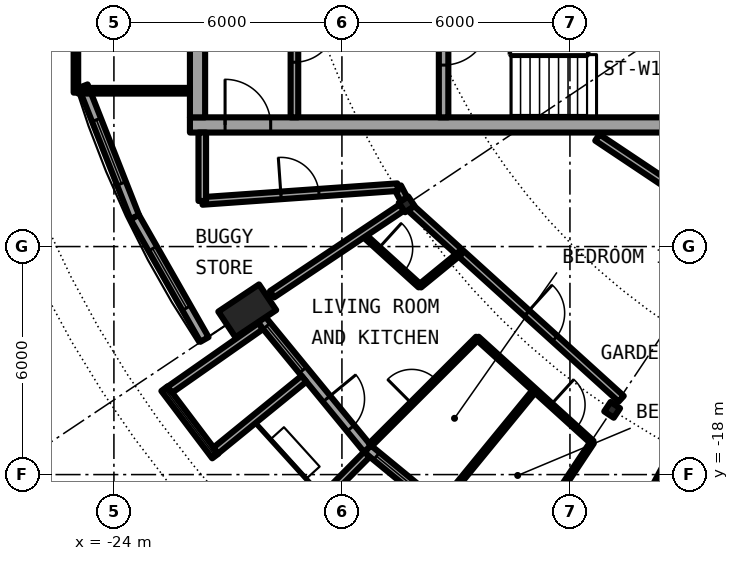
"""IFC4 building model, lengths in metres.
Left out: names, types, materials, properties, quantities, classifications, styles, units other than length and angle.
Written with IfcOpenShell. Run it as: python <this file> out.ifc"""

import sys

from ifc_helpers import new_model, si_unit, direction, frame, frame_2d, origin, origin_2d, place, context, subcontext, project, spatial, rectangle, circle, hollow_circle, i_section, extrude, element, fill, save


model = new_model("IFC4")
c1 = context("Model", 3, precision=1e-05, world=origin(), true_north=direction((0.0, 1.0)))
c2 = subcontext(c1, "Body", "Model", "MODEL_VIEW")
j1 = project(units=[si_unit("LENGTHUNIT", "METRE"), si_unit("PLANEANGLEUNIT", "RADIAN")], contexts=[c1])
p1 = place(None, origin())
s1 = spatial("IfcSite", under=j1, at=p1, CompositionType="ELEMENT")
p2 = place(p1, origin())
s2 = spatial("IfcBuilding", under=s1, at=p2, CompositionType="ELEMENT")
p3 = place(p2, frame((0.0, 0.0, 243.2)))
s3 = spatial("IfcBuildingStorey", under=s2, at=p3, CompositionType="ELEMENT", Elevation=243.2)
p4 = place(p3, frame((-21.027, -14.05, 0.242), z_axis=(0.346875102267, 0.231750495433, 0.908828570905), x_axis=(-0.555530396269, 0.831496228988, 0.0)))
e1 = element("IfcColumn", 1, at=p4, inside=s3, PredefinedType="COLUMN", context=c2, shape_type="SweptSolid", body=[
    extrude(hollow_circle(Radius=0.406, WallThickness=0.03, at=origin_2d()), origin(), (0.0, 0.0, 1.0), 3.09),
])
for number, where, z_axis, x_axis in (
    (2, (-16.297, -10.889, 0.0), (0.0, 0.0, 1.0), (-0.831, -0.556, 0.0)),
    (3, (-10.889, -16.297, 0.0), (0.0, 0.0, 1.0), (-0.556, -0.831, 0.0)),
):
    element("IfcColumn", number, at=place(p3, frame(where, z_axis=z_axis, x_axis=x_axis)), inside=s3, PredefinedType="COLUMN", context=c2, shape_type="SweptSolid", body=[
        extrude(i_section(OverallWidth=0.3, OverallDepth=0.3, WebThickness=0.011, FlangeThickness=0.019, FilletRadius=0.027, at=origin_2d()), origin(), (0.0, 0.0, 1.0), 3.05),
    ])
p5 = place(p3, frame((-20.371, -13.611, 0.0), z_axis=(0.0, 0.0, 1.0), x_axis=(0.634396836208, -0.773007538262, 0.0)))
e4 = element("IfcWall", 4, at=p5, inside=s3, PredefinedType="SOLIDWALL", context=c2, shape_type="SweptSolid", body=[
    extrude(rectangle(XDim=4.803, YDim=0.25, at=frame_2d((2.402, 0.0))), origin(), (0.0, 0.0, 1.0), 2.7),
])
p6 = place(p5, frame((0.62, 0.0, 0.3)))
e5 = element("IfcOpeningElement", 5, at=p6, cuts=e4, PredefinedType="OPENING", context=c2, shape_type="SweptSolid", body=[
    extrude(rectangle(XDim=1.5, YDim=2.1, at=frame_2d((0.75, 1.05))), frame((0.0, 0.135, 0.0), z_axis=(0.0, -1.0, 0.0), x_axis=(1.0, 0.0, 0.0)), (0.0, 0.0, 1.0), 0.27),
])
p7 = place(p5, frame((3.099, 0.0, 0.0)))
e6 = element("IfcOpeningElement", 6, at=p7, cuts=e4, PredefinedType="OPENING", context=c2, shape_type="SweptSolid", body=[
    extrude(rectangle(XDim=1.0, YDim=2.2, at=frame_2d((0.5, 1.1))), frame((0.0, 0.135, 0.0), z_axis=(0.0, -1.0, 0.0), x_axis=(1.0, 0.0, 0.0)), (0.0, 0.0, 1.0), 0.27),
])
p8 = place(p3, frame((-22.672, -15.74, -0.03), z_axis=(0.0, 0.0, 1.0), x_axis=(0.602915500641, -0.797805050803, 0.0)))
e7 = element("IfcWall", 7, at=p8, inside=s3, PredefinedType="SOLIDWALL", context=c2, shape_type="SweptSolid", body=[
    extrude(rectangle(XDim=2.221, YDim=0.2, at=frame_2d((1.11, 0.0))), origin(), (0.0, 0.0, 1.0), 2.73),
])
p9 = place(p8, frame((0.071, 0.0, 0.33)))
e8 = element("IfcOpeningElement", 8, at=p9, cuts=e7, PredefinedType="OPENING", context=c2, shape_type="SweptSolid", body=[
    extrude(circle(Radius=1.04, at=frame_2d((1.04, 1.04))), frame((0.0, 0.11, 0.0), z_axis=(0.0, -1.0, 0.0), x_axis=(1.0, 0.0, 0.0)), (0.0, 0.0, 1.0), 0.22),
])
p10 = place(p3, frame((-20.138, -14.093, -0.03), z_axis=(0.0, 0.0, 1.0), x_axis=(-0.81913764619, -0.573596998419, 0.0)))
e9 = element("IfcWall", 9, at=p10, inside=s3, PredefinedType="SOLIDWALL", context=c2, shape_type="SweptSolid", body=[
    extrude(rectangle(XDim=2.92, YDim=0.2, at=frame_2d((1.46, 0.0))), origin(), (0.0, 0.0, 1.0), 2.73),
])
p11 = place(p3, frame((-19.0, -15.479, -0.03), z_axis=(0.0, 0.0, 1.0), x_axis=(-0.775612161439, -0.631209771017, 0.0)))
e10 = element("IfcWall", 10, at=p11, inside=s3, PredefinedType="SOLIDWALL", context=c2, shape_type="SweptSolid", body=[
    extrude(rectangle(XDim=2.992, YDim=0.2, at=frame_2d((1.496, 0.0))), origin(), (0.0, 0.0, 1.0), 2.73),
])
p12 = place(p3, frame((-17.324, -17.324, 0.0), z_axis=(0.0, 0.0, 1.0), x_axis=(0.773007538262, -0.634396836208, 0.0)))
e11 = element("IfcWall", 11, at=p12, inside=s3, PredefinedType="SOLIDWALL", context=c2, shape_type="SweptSolid", body=[
    extrude(rectangle(XDim=4.803, YDim=0.25, at=frame_2d((2.402, 0.0))), origin(), (0.0, 0.0, 1.0), 2.7),
])
p13 = place(p12, frame((0.304, 0.0, 0.3)))
e12 = element("IfcOpeningElement", 12, at=p13, cuts=e11, PredefinedType="OPENING", context=c2, shape_type="SweptSolid", body=[
    extrude(rectangle(XDim=1.8, YDim=2.1, at=frame_2d((0.9, 1.05))), frame((0.0, 0.135, 0.0), z_axis=(0.0, -1.0, 0.0), x_axis=(1.0, 0.0, 0.0)), (0.0, 0.0, 1.0), 0.27),
])
p14 = place(p12, frame((3.099, 0.0, 0.0)))
e13 = element("IfcOpeningElement", 13, at=p14, cuts=e11, PredefinedType="OPENING", context=c2, shape_type="SweptSolid", body=[
    extrude(rectangle(XDim=1.0, YDim=2.2, at=frame_2d((0.5, 1.1))), frame((0.0, 0.135, 0.0), z_axis=(0.0, -1.0, 0.0), x_axis=(1.0, 0.0, 0.0)), (0.0, 0.0, 1.0), 0.27),
])
p15 = place(p3, frame((-17.344, -17.47, -0.03), z_axis=(0.0, 0.0, 1.0), x_axis=(-0.704306055012, -0.709896457854, 0.0)))
e14 = element("IfcWall", 14, at=p15, inside=s3, PredefinedType="SOLIDWALL", context=c2, shape_type="SweptSolid", body=[
    extrude(rectangle(XDim=2.882, YDim=0.2, at=frame_2d((1.441, 0.0))), origin(), (0.0, 0.0, 1.0), 2.73),
])
p16 = place(p3, frame((-24.809, -7.779, 0.0), z_axis=(0.0, 0.0, 1.0), x_axis=(0.366351636034, -0.930476479432, 0.0)))
e15 = element("IfcWall", 15, at=p16, inside=s3, PredefinedType="SOLIDWALL", context=c2, shape_type="SweptSolid", body=[
    extrude(rectangle(XDim=3.705, YDim=0.25, at=frame_2d((1.852, 0.0))), origin(), (0.0, 0.0, 1.0), 2.7),
])
p17 = place(p16, frame((0.952, 0.0, 0.3)))
e16 = element("IfcOpeningElement", 16, at=p17, cuts=e15, PredefinedType="OPENING", context=c2, shape_type="SweptSolid", body=[
    extrude(rectangle(XDim=1.8, YDim=2.1, at=frame_2d((0.9, 1.05))), frame((0.0, 0.135, 0.0), z_axis=(0.0, -1.0, 0.0), x_axis=(1.0, 0.0, 0.0)), (0.0, 0.0, 1.0), 0.27),
])
p18 = place(p3, frame((-23.452, -11.226, 0.0), z_axis=(0.0, 0.0, 1.0), x_axis=(0.495031435966, -0.868875064325, 0.0)))
e17 = element("IfcWall", 17, at=p18, inside=s3, PredefinedType="SOLIDWALL", context=c2, shape_type="SweptSolid", body=[
    extrude(rectangle(XDim=3.705, YDim=0.25, at=frame_2d((1.853, 0.0))), origin(), (0.0, 0.0, 1.0), 2.7),
])
p19 = place(p18, frame((0.952, 0.0, 0.3)))
e18 = element("IfcOpeningElement", 18, at=p19, cuts=e17, PredefinedType="OPENING", context=c2, shape_type="SweptSolid", body=[
    extrude(rectangle(XDim=1.8, YDim=2.1, at=frame_2d((0.9, 1.05))), frame((0.0, 0.135, 0.0), z_axis=(0.0, -1.0, 0.0), x_axis=(1.0, 0.0, 0.0)), (0.0, 0.0, 1.0), 0.27),
])
p20 = place(p3, frame((-22.0, -8.8, 0.0), z_axis=(0.0, 0.0, 1.0), x_axis=(1.0, 0.0, 0.0)))
e19 = element("IfcWall", 19, at=p20, inside=s3, PredefinedType="SHEAR", context=c2, shape_type="SweptSolid", body=[
    extrude(rectangle(XDim=13.4, YDim=0.4, at=frame_2d((6.7, 0.0))), origin(), (0.0, 0.0, 1.0), 3.05),
])
p21 = place(p20, frame((0.925, 0.0, 0.0)))
e20 = element("IfcOpeningElement", 20, at=p21, cuts=e19, PredefinedType="OPENING", context=c2, shape_type="SweptSolid", body=[
    extrude(rectangle(XDim=1.2, YDim=2.3, at=frame_2d((0.6, 1.15))), frame((0.0, 0.21, 0.0), z_axis=(0.0, -1.0, 0.0), x_axis=(1.0, 0.0, 0.0)), (0.0, 0.0, 1.0), 0.42),
])
p22 = place(p3, frame((-21.8, -8.6, 0.0), z_axis=(0.0, 0.0, 1.0), x_axis=(0.0, 1.0, 0.0)))
e21 = element("IfcWall", 21, at=p22, inside=s3, PredefinedType="SHEAR", context=c2, shape_type="SweptSolid", body=[
    extrude(rectangle(XDim=17.2, YDim=0.4, at=frame_2d((8.6, 0.0))), origin(), (0.0, 0.0, 1.0), 3.05),
])
p23 = place(p22, frame((7.7, 0.0, 0.0)))
e22 = element("IfcOpeningElement", 22, at=p23, cuts=e21, PredefinedType="OPENING", context=c2, shape_type="SweptSolid", body=[
    extrude(rectangle(XDim=1.8, YDim=2.3, at=frame_2d((0.9, 1.15))), frame((0.0, 0.21, 0.0), z_axis=(0.0, -1.0, 0.0), x_axis=(1.0, 0.0, 0.0)), (0.0, 0.0, 1.0), 0.42),
])
p24 = place(p3, frame((-15.325, -4.65, 0.0), z_axis=(0.0, 0.0, 1.0), x_axis=(0.0, -1.0, 0.0)))
e23 = element("IfcWall", 23, at=p24, inside=s3, PredefinedType="SHEAR", context=c2, shape_type="SweptSolid", body=[
    extrude(rectangle(XDim=3.95, YDim=0.25, at=frame_2d((1.975, 0.0))), origin(), (0.0, 0.0, 1.0), 3.05),
])
p25 = place(p24, frame((1.375, 0.0, 0.0)))
e24 = element("IfcOpeningElement", 24, at=p25, cuts=e23, PredefinedType="OPENING", context=c2, shape_type="SweptSolid", body=[
    extrude(rectangle(XDim=1.2, YDim=2.3, at=frame_2d((0.6, 1.15))), frame((0.0, 0.135, 0.0), z_axis=(0.0, -1.0, 0.0), x_axis=(1.0, 0.0, 0.0)), (0.0, 0.0, 1.0), 0.27),
])
p26 = place(p3, frame((-19.25, -1.575, 0.0), z_axis=(0.0, 0.0, 1.0), x_axis=(0.0, -1.0, 0.0)))
e25 = element("IfcWall", 25, at=p26, inside=s3, PredefinedType="SOLIDWALL", context=c2, shape_type="SweptSolid", body=[
    extrude(rectangle(XDim=7.025, YDim=0.2, at=frame_2d((3.513, 0.0))), origin(), (0.0, 0.0, 1.0), 2.7),
])
p27 = place(p26, frame((4.475, 0.0, 0.0)))
e26 = element("IfcOpeningElement", 26, at=p27, cuts=e25, PredefinedType="OPENING", context=c2, shape_type="SweptSolid", body=[
    extrude(rectangle(XDim=1.1, YDim=2.3, at=frame_2d((0.55, 1.15))), frame((0.0, 0.11, 0.0), z_axis=(0.0, -1.0, 0.0), x_axis=(1.0, 0.0, 0.0)), (0.0, 0.0, 1.0), 0.22),
])
p28 = place(p3, frame((-22.0, -7.9, 0.0), z_axis=(0.0, 0.0, 1.0), x_axis=(-1.0, 0.0, 0.0)))
e27 = element("IfcWall", 27, at=p28, inside=s3, PredefinedType="PARTITIONING", context=c2, shape_type="SweptSolid", body=[
    extrude(rectangle(XDim=2.94, YDim=0.15, at=frame_2d((1.47, 0.0))), origin(), (0.0, 0.0, 1.0), 2.7),
])
p29 = place(p3, frame((-25.0, 7.95, 0.0), z_axis=(0.0, 0.0, 1.0), x_axis=(0.0, -1.0, 0.0)))
e28 = element("IfcWall", 28, at=p29, inside=s3, PredefinedType="PARTITIONING", context=c2, shape_type="SweptSolid", body=[
    extrude(rectangle(XDim=15.9, YDim=0.12, at=frame_2d((7.95, 0.0))), origin(), (0.0, 0.0, 1.0), 2.7),
])
p30 = place(p29, frame((0.95, 0.0, 0.1)))
e29 = element("IfcOpeningElement", 29, at=p30, cuts=e28, PredefinedType="OPENING", context=c2, shape_type="SweptSolid", body=[
    extrude(rectangle(XDim=14.0, YDim=2.35, at=frame_2d((7.0, 1.175))), frame((0.0, 0.07, 0.0), z_axis=(0.0, -1.0, 0.0), x_axis=(1.0, 0.0, 0.0)), (0.0, 0.0, 1.0), 0.14),
])
p31 = place(p3, frame((-17.461, -11.667, 0.0), z_axis=(0.0, 0.0, 1.0), x_axis=(0.740773018627, -0.671755412984, 0.0)))
e30 = element("IfcWall", 30, at=p31, inside=s3, PredefinedType="PARTITIONING", context=c2, shape_type="SweptSolid", body=[
    extrude(rectangle(XDim=2.041, YDim=0.1, at=frame_2d((1.021, 0.0))), origin(), (0.0, 0.0, 1.0), 2.7),
])
p32 = place(p31, frame((0.571, 0.0, 0.0)))
e31 = element("IfcOpeningElement", 31, at=p32, cuts=e30, PredefinedType="OPENING", context=c2, shape_type="SweptSolid", body=[
    extrude(rectangle(XDim=0.9, YDim=2.3, at=frame_2d((0.45, 1.15))), frame((0.0, 0.06, 0.0), z_axis=(0.0, -1.0, 0.0), x_axis=(1.0, 0.0, 0.0)), (0.0, 0.0, 1.0), 0.12),
])
p33 = place(p3, frame((-14.437, -14.409, 0.0), z_axis=(0.0, 0.0, 1.0), x_axis=(0.740802780294, -0.671722592078, 0.0)))
e32 = element("IfcWall", 32, at=p33, inside=s3, PredefinedType="PARTITIONING", context=c2, shape_type="SweptSolid", body=[
    extrude(rectangle(XDim=4.082, YDim=0.1, at=frame_2d((2.041, 0.0))), origin(), (0.0, 0.0, 1.0), 2.7),
])
p34 = place(p33, frame((2.612, 0.0, 0.0)))
e33 = element("IfcOpeningElement", 33, at=p34, cuts=e32, PredefinedType="OPENING", context=c2, shape_type="SweptSolid", body=[
    extrude(rectangle(XDim=0.9, YDim=2.3, at=frame_2d((0.45, 1.15))), frame((0.0, 0.06, 0.0), z_axis=(0.0, -1.0, 0.0), x_axis=(1.0, 0.0, 0.0)), (0.0, 0.0, 1.0), 0.12),
])
p35 = place(p3, frame((-16.535, -10.437, 0.0), z_axis=(0.0, 0.0, 1.0), x_axis=(0.465802239822, -0.884888848035, 0.0)))
e34 = element("IfcWall", 34, at=p35, inside=s3, PredefinedType="PARTITIONING", context=c2, shape_type="SweptSolid", body=[
    extrude(rectangle(XDim=0.361, YDim=0.2, at=frame_2d((0.18, 0.0))), origin(), (0.0, 0.0, 1.0), 2.7),
])
p36 = place(p3, frame((-16.182, -10.993, 0.0), z_axis=(0.0, 0.0, 1.0), x_axis=(0.740939653983, -0.671571611339, 0.0)))
e35 = element("IfcWall", 35, at=p36, inside=s3, PredefinedType="PARTITIONING", context=c2, shape_type="SweptSolid", body=[
    extrude(rectangle(XDim=7.465, YDim=0.2, at=frame_2d((3.732, 0.0))), origin(), (0.0, 0.0, 1.0), 2.45),
])
p37 = place(p36, frame((4.107, 0.0, 0.0)))
e36 = element("IfcOpeningElement", 36, at=p37, cuts=e35, PredefinedType="OPENING", context=c2, shape_type="SweptSolid", body=[
    extrude(rectangle(XDim=1.0, YDim=2.3, at=frame_2d((0.5, 1.15))), frame((0.0, 0.11, 0.0), z_axis=(0.0, -1.0, 0.0), x_axis=(1.0, 0.0, 0.0)), (0.0, 0.0, 1.0), 0.22),
])
p38 = place(p3, frame((-11.279, -9.131, 0.0), z_axis=(0.0, 0.0, 1.0), x_axis=(0.831522779461, -0.555490654501, 0.0)))
e37 = element("IfcWall", 37, at=p38, inside=s3, PredefinedType="PARTITIONING", context=c2, shape_type="SweptSolid", body=[
    extrude(rectangle(XDim=10.047, YDim=0.2, at=frame_2d((5.023, 0.0))), origin(), (0.0, 0.0, 1.0), 2.7),
])
p39 = place(p38, frame((5.239, 0.0, 0.0)))
e38 = element("IfcOpeningElement", 38, at=p39, cuts=e37, PredefinedType="OPENING", context=c2, shape_type="SweptSolid", body=[
    extrude(rectangle(XDim=1.0, YDim=2.3, at=frame_2d((0.5, 1.15))), frame((0.0, 0.11, 0.0), z_axis=(0.0, -1.0, 0.0), x_axis=(1.0, 0.0, 0.0)), (0.0, 0.0, 1.0), 0.22),
])
p40 = place(p3, frame((-21.675, -10.8, 0.0), z_axis=(0.0, 0.0, 1.0), x_axis=(0.997515141784, 0.070452408845, 0.0)))
e39 = element("IfcWall", 39, at=p40, inside=s3, PredefinedType="PARTITIONING", context=c2, shape_type="SweptSolid", body=[
    extrude(rectangle(XDim=5.153, YDim=0.2, at=frame_2d((2.576, 0.0))), origin(), (0.0, 0.0, 1.0), 2.7),
])
p41 = place(p40, frame((2.076, 0.0, 0.0)))
e40 = element("IfcOpeningElement", 40, at=p41, cuts=e39, PredefinedType="OPENING", context=c2, shape_type="SweptSolid", body=[
    extrude(rectangle(XDim=1.0, YDim=2.3, at=frame_2d((0.5, 1.15))), frame((0.0, 0.11, 0.0), z_axis=(0.0, -1.0, 0.0), x_axis=(1.0, 0.0, 0.0)), (0.0, 0.0, 1.0), 0.22),
])
p42 = place(p3, frame((-19.838, -13.255, 0.0), z_axis=(0.0, 0.0, 1.0), x_axis=(0.831400632185, 0.55567345519, 0.0)))
e41 = element("IfcWall", 41, at=p42, inside=s3, PredefinedType="PARTITIONING", context=c2, shape_type="SweptSolid", body=[
    extrude(rectangle(XDim=4.108, YDim=0.2, at=frame_2d((2.054, 0.0))), origin(), (0.0, 0.0, 1.0), 2.7),
])
p43 = place(p3, frame((-17.252, -17.219, 0.0), z_axis=(0.0, 0.0, 1.0), x_axis=(0.707720109647, 0.706492920277, 0.0)))
e42 = element("IfcWall", 42, at=p43, inside=s3, PredefinedType="PARTITIONING", context=c2, shape_type="SweptSolid", body=[
    extrude(rectangle(XDim=3.979, YDim=0.1, at=frame_2d((1.989, 0.0))), origin(), (0.0, 0.0, 1.0), 2.7),
])
p44 = place(p43, frame((1.539, 0.0, 0.0)))
e43 = element("IfcOpeningElement", 43, at=p44, cuts=e42, PredefinedType="OPENING", context=c2, shape_type="SweptSolid", body=[
    extrude(rectangle(XDim=0.9, YDim=2.3, at=frame_2d((0.45, 1.15))), frame((0.0, 0.06, 0.0), z_axis=(0.0, -1.0, 0.0), x_axis=(1.0, 0.0, 0.0)), (0.0, 0.0, 1.0), 0.12),
])
p45 = place(p3, frame((-15.949, -13.038, 0.0), z_axis=(0.0, 0.0, 1.0), x_axis=(0.774099733189, 0.633063664315, 0.0)))
e44 = element("IfcWall", 44, at=p45, inside=s3, PredefinedType="PARTITIONING", context=c2, shape_type="SweptSolid", body=[
    extrude(rectangle(XDim=1.375, YDim=0.1, at=frame_2d((0.687, 0.0))), origin(), (0.0, 0.0, 1.0), 2.7),
])
p46 = place(p3, frame((-15.445, -18.857, 0.0), z_axis=(0.0, 0.0, 1.0), x_axis=(0.633648720881, 0.77362090104, 0.0)))
e45 = element("IfcWall", 45, at=p46, inside=s3, PredefinedType="PARTITIONING", context=c2, shape_type="SweptSolid", body=[
    extrude(rectangle(XDim=3.979, YDim=0.1, at=frame_2d((1.989, 0.0))), origin(), (0.0, 0.0, 1.0), 2.7),
])
p47 = place(p3, frame((-13.217, -19.864, 0.0), z_axis=(0.0, 0.0, 1.0), x_axis=(0.553749157203, 0.832683535862, 0.0)))
e46 = element("IfcWall", 46, at=p47, inside=s3, PredefinedType="PARTITIONING", context=c2, shape_type="SweptSolid", body=[
    extrude(rectangle(XDim=3.26, YDim=0.1, at=frame_2d((1.63, 0.0))), origin(), (0.0, 0.0, 1.0), 2.7),
])
p48 = place(p47, frame((0.922, 0.0, 0.0)))
e47 = element("IfcOpeningElement", 47, at=p48, cuts=e46, PredefinedType="OPENING", context=c2, shape_type="SweptSolid", body=[
    extrude(rectangle(XDim=0.9, YDim=2.3, at=frame_2d((0.45, 1.15))), frame((0.0, 0.06, 0.0), z_axis=(0.0, -1.0, 0.0), x_axis=(1.0, 0.0, 0.0)), (0.0, 0.0, 1.0), 0.12),
])
p49 = place(p3, frame((-21.675, -10.8, 0.0), z_axis=(0.0, 0.0, 1.0), x_axis=(0.0, 1.0, 0.0)))
e48 = element("IfcWall", 48, at=p49, inside=s3, PredefinedType="PARTITIONING", context=c2, shape_type="SweptSolid", body=[
    extrude(rectangle(XDim=1.8, YDim=0.2, at=frame_2d((0.9, 0.0))), origin(), (0.0, 0.0, 1.0), 2.7),
])
p50 = place(p3, frame((-9.889, -18.502, 0.0), z_axis=(0.0, 0.0, 1.0), x_axis=(0.471138605408, 0.882059189904, 0.0)))
e49 = element("IfcWall", 49, at=p50, inside=s3, PredefinedType="PARTITIONING", context=c2, shape_type="SweptSolid", body=[
    extrude(rectangle(XDim=1.358, YDim=0.1, at=frame_2d((0.679, 0.0))), origin(), (0.0, 0.0, 1.0), 2.7),
])
p51 = place(p6, origin())
e50 = element("IfcWindow", 50, at=p51, inside=s3, PartitioningType="SINGLE_PANEL", PredefinedType="WINDOW", context=c2, shape_type="SweptSolid", body=[
    extrude(rectangle(XDim=1.5, YDim=2.1, at=frame_2d((0.75, 1.05))), frame((0.0, 0.03, 0.0), z_axis=(0.0, -1.0, 0.0), x_axis=(1.0, 0.0, 0.0)), (0.0, 0.0, 1.0), 0.06),
])
fill(e5, e50)
p52 = place(p9, origin())
e51 = element("IfcWindow", 51, at=p52, inside=s3, PartitioningType="SINGLE_PANEL", PredefinedType="WINDOW", context=c2, shape_type="SweptSolid", body=[
    extrude(circle(Radius=1.04, at=frame_2d((1.04, 1.04))), frame((0.0, 0.03, 0.0), z_axis=(0.0, -1.0, 0.0), x_axis=(1.0, 0.0, 0.0)), (0.0, 0.0, 1.0), 0.06),
])
fill(e8, e51)
p53 = place(p7, origin())
e52 = element("IfcDoor", 52, at=p53, inside=s3, OperationType="SINGLE_SWING_LEFT", PredefinedType="DOOR", context=c2, shape_type="SweptSolid", body=[
    extrude(rectangle(XDim=1.0, YDim=2.2, at=frame_2d((0.5, 1.1))), frame((0.0, 0.025, 0.0), z_axis=(0.0, -1.0, 0.0), x_axis=(1.0, 0.0, 0.0)), (0.0, 0.0, 1.0), 0.05),
])
fill(e6, e52)
p54 = place(p13, origin())
e53 = element("IfcWindow", 53, at=p54, inside=s3, PartitioningType="SINGLE_PANEL", PredefinedType="WINDOW", context=c2, shape_type="SweptSolid", body=[
    extrude(rectangle(XDim=1.8, YDim=2.1, at=frame_2d((0.9, 1.05))), frame((0.0, 0.03, 0.0), z_axis=(0.0, -1.0, 0.0), x_axis=(1.0, 0.0, 0.0)), (0.0, 0.0, 1.0), 0.06),
])
fill(e12, e53)
p55 = place(p17, origin())
e54 = element("IfcWindow", 54, at=p55, inside=s3, PartitioningType="SINGLE_PANEL", PredefinedType="WINDOW", context=c2, shape_type="SweptSolid", body=[
    extrude(rectangle(XDim=1.8, YDim=2.1, at=frame_2d((0.9, 1.05))), frame((0.0, 0.03, 0.0), z_axis=(0.0, -1.0, 0.0), x_axis=(1.0, 0.0, 0.0)), (0.0, 0.0, 1.0), 0.06),
])
fill(e16, e54)
p56 = place(p19, origin())
e55 = element("IfcWindow", 55, at=p56, inside=s3, PartitioningType="SINGLE_PANEL", PredefinedType="WINDOW", context=c2, shape_type="SweptSolid", body=[
    extrude(rectangle(XDim=1.8, YDim=2.1, at=frame_2d((0.9, 1.05))), frame((0.0, 0.03, 0.0), z_axis=(0.0, -1.0, 0.0), x_axis=(1.0, 0.0, 0.0)), (0.0, 0.0, 1.0), 0.06),
])
fill(e18, e55)
p57 = place(p25, origin())
e56 = element("IfcDoor", 56, at=p57, inside=s3, OperationType="SINGLE_SWING_LEFT", PredefinedType="DOOR", context=c2, shape_type="SweptSolid", body=[
    extrude(rectangle(XDim=1.2, YDim=2.3, at=frame_2d((0.6, 1.15))), frame((0.0, 0.025, 0.0), z_axis=(0.0, -1.0, 0.0), x_axis=(1.0, 0.0, 0.0)), (0.0, 0.0, 1.0), 0.05),
])
fill(e24, e56)
p58 = place(p27, origin())
e57 = element("IfcDoor", 57, at=p58, inside=s3, OperationType="SINGLE_SWING_LEFT", PredefinedType="DOOR", context=c2, shape_type="SweptSolid", body=[
    extrude(rectangle(XDim=1.1, YDim=2.3, at=frame_2d((0.55, 1.15))), frame((0.0, 0.025, 0.0), z_axis=(0.0, -1.0, 0.0), x_axis=(1.0, 0.0, 0.0)), (0.0, 0.0, 1.0), 0.05),
])
fill(e26, e57)
p59 = place(p21, origin())
e58 = element("IfcDoor", 58, at=p59, inside=s3, OperationType="SINGLE_SWING_RIGHT", PredefinedType="DOOR", context=c2, shape_type="SweptSolid", body=[
    extrude(rectangle(XDim=1.2, YDim=2.3, at=frame_2d((0.6, 1.15))), frame((0.0, 0.025, 0.0), z_axis=(0.0, -1.0, 0.0), x_axis=(1.0, 0.0, 0.0)), (0.0, 0.0, 1.0), 0.05),
])
fill(e20, e58)
p60 = place(p30, origin())
e59 = element("IfcWindow", 59, at=p60, inside=s3, PartitioningType="SINGLE_PANEL", PredefinedType="WINDOW", context=c2, shape_type="SweptSolid", body=[
    extrude(rectangle(XDim=14.0, YDim=2.35, at=frame_2d((7.0, 1.175))), frame((0.0, 0.03, 0.0), z_axis=(0.0, -1.0, 0.0), x_axis=(1.0, 0.0, 0.0)), (0.0, 0.0, 1.0), 0.06),
])
fill(e29, e59)
p61 = place(p37, origin())
e60 = element("IfcDoor", 60, at=p61, inside=s3, OperationType="SINGLE_SWING_RIGHT", PredefinedType="DOOR", context=c2, shape_type="SweptSolid", body=[
    extrude(rectangle(XDim=1.0, YDim=2.3, at=frame_2d((0.5, 1.15))), frame((0.0, 0.025, 0.0), z_axis=(0.0, -1.0, 0.0), x_axis=(1.0, 0.0, 0.0)), (0.0, 0.0, 1.0), 0.05),
])
fill(e36, e60)
p62 = place(p32, origin())
e61 = element("IfcDoor", 61, at=p62, inside=s3, OperationType="SINGLE_SWING_LEFT", PredefinedType="DOOR", context=c2, shape_type="SweptSolid", body=[
    extrude(rectangle(XDim=0.9, YDim=2.3, at=frame_2d((0.45, 1.15))), frame((0.0, 0.025, 0.0), z_axis=(0.0, -1.0, 0.0), x_axis=(1.0, 0.0, 0.0)), (0.0, 0.0, 1.0), 0.05),
])
fill(e31, e61)
p63 = place(p44, origin())
e62 = element("IfcDoor", 62, at=p63, inside=s3, OperationType="SINGLE_SWING_RIGHT", PredefinedType="DOOR", context=c2, shape_type="SweptSolid", body=[
    extrude(rectangle(XDim=0.9, YDim=2.3, at=frame_2d((0.45, 1.15))), frame((0.0, 0.025, 0.0), z_axis=(0.0, -1.0, 0.0), x_axis=(1.0, 0.0, 0.0)), (0.0, 0.0, 1.0), 0.05),
])
fill(e43, e62)
p64 = place(p34, origin())
e63 = element("IfcDoor", 63, at=p64, inside=s3, OperationType="SINGLE_SWING_RIGHT", PredefinedType="DOOR", context=c2, shape_type="SweptSolid", body=[
    extrude(rectangle(XDim=0.9, YDim=2.3, at=frame_2d((0.45, 1.15))), frame((0.0, 0.025, 0.0), z_axis=(0.0, -1.0, 0.0), x_axis=(1.0, 0.0, 0.0)), (0.0, 0.0, 1.0), 0.05),
])
fill(e33, e63)
p65 = place(p41, origin())
e64 = element("IfcDoor", 64, at=p65, inside=s3, OperationType="SINGLE_SWING_RIGHT", PredefinedType="DOOR", context=c2, shape_type="SweptSolid", body=[
    extrude(rectangle(XDim=1.0, YDim=2.3, at=frame_2d((0.5, 1.15))), frame((0.0, 0.025, 0.0), z_axis=(0.0, -1.0, 0.0), x_axis=(1.0, 0.0, 0.0)), (0.0, 0.0, 1.0), 0.05),
])
fill(e40, e64)
save(model, sys.argv[1])
